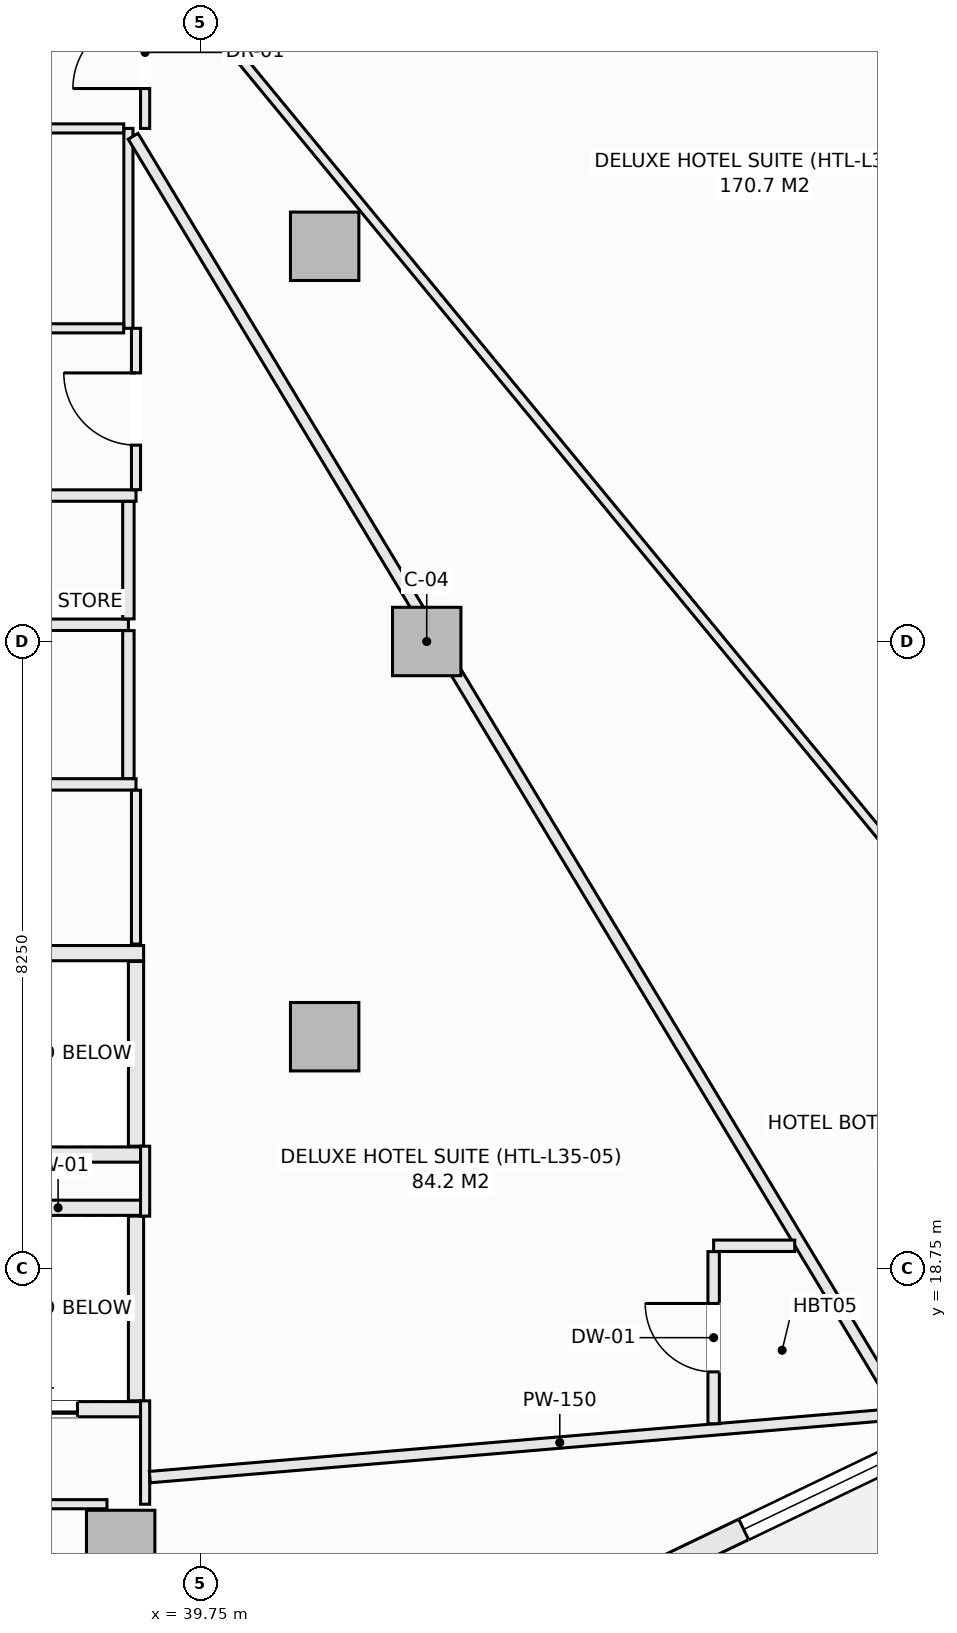
"""IFC4 building model, lengths in metres.
Left out: names, types, materials, properties, quantities, classifications, styles, units other than length and angle.
Written with IfcOpenShell. Run it as: python <this file> out.ifc"""

import sys

from ifc_helpers import new_model, si_unit, direction, frame, frame_2d, origin, origin_2d, place, context, subcontext, project, spatial, rectangle, extrude, element, fill, save


model = new_model("IFC4")
c1 = context("Model", 3, precision=1e-05, world=origin(), true_north=direction((0.0, 1.0)))
c2 = subcontext(c1, "Body", "Model", "MODEL_VIEW")
j1 = project(units=[si_unit("LENGTHUNIT", "METRE"), si_unit("PLANEANGLEUNIT", "RADIAN")], contexts=[c1])
p1 = place(None, origin())
s1 = spatial("IfcSite", under=j1, at=p1, CompositionType="ELEMENT")
p2 = place(p1, origin())
s2 = spatial("IfcBuilding", under=s1, at=p2, CompositionType="ELEMENT")
p3 = place(p2, frame((0.0, 0.0, 139.3)))
s3 = spatial("IfcBuildingStorey", under=s2, at=p3, CompositionType="ELEMENT", Elevation=139.3)
for number, where, z_axis, x_axis in (
    (1, (42.725, 27.0, -0.27), (0.0, 0.0, 1.0), (1.0, 0.0, 0.0)),
    (2, (41.382, 32.199, -0.27), (0.0, 0.0, 1.0), (1.0, 0.0, 0.0)),
    (3, (38.698, 15.121, -0.27), (0.0, 0.0, 1.0), (1.0, 0.0, 0.0)),
    (4, (41.382, 21.801, -0.27), (0.0, 0.0, 1.0), (1.0, 0.0, 0.0)),
):
    element("IfcColumn", number, at=place(p3, frame(where, z_axis=z_axis, x_axis=x_axis)), inside=s3, PredefinedType="COLUMN", context=c2, shape_type="SweptSolid", body=[
        extrude(rectangle(XDim=0.9, YDim=0.9, at=origin_2d()), origin(), (0.0, 0.0, 1.0), 3.4),
    ])
p4 = place(p3, frame((45.769, 14.777, 0.0), z_axis=(0.0, 0.0, 1.0), x_axis=(0.901370184739, 0.433049408339, 0.0)))
e5 = element("IfcWall", 5, at=p4, inside=s3, PredefinedType="SOLIDWALL", context=c2, shape_type="SweptSolid", body=[
    extrude(rectangle(XDim=5.884, YDim=0.3, at=frame_2d((2.942, 0.0))), origin(), (0.0, 0.0, 1.0), 2.653),
])
p5 = place(p4, frame((1.25, 0.0, 0.74)))
e6 = element("IfcOpeningElement", 6, at=p5, cuts=e5, PredefinedType="OPENING", context=c2, shape_type="SweptSolid", body=[
    extrude(rectangle(XDim=2.1, YDim=1.7, at=frame_2d((1.05, 0.85))), frame((0.0, 0.16, 0.0), z_axis=(0.0, -1.0, 0.0), x_axis=(1.0, 0.0, 0.0)), (0.0, 0.0, 1.0), 0.32),
])
p6 = place(p3, frame((48.413, 12.668, 0.0), z_axis=(0.0, 0.0, 1.0), x_axis=(0.869187658335, 0.494482370361, 0.0)))
e7 = element("IfcWall", 7, at=p6, inside=s3, PredefinedType="PARAPET", context=c2, shape_type="SweptSolid", body=[
    extrude(rectangle(XDim=6.606, YDim=0.22, at=frame_2d((3.303, 0.0))), origin(), (0.0, 0.0, 1.0), 0.52),
])
p7 = place(p3, frame((36.75, 19.55, 0.0), z_axis=(0.0, 0.0, 1.0), x_axis=(1.0, 0.0, 0.0)))
e8 = element("IfcWall", 8, at=p7, inside=s3, PredefinedType="SOLIDWALL", context=c2, shape_type="SweptSolid", body=[
    extrude(rectangle(XDim=2.25, YDim=0.2, at=frame_2d((1.125, 0.0))), origin(), (0.0, 0.0, 1.0), 3.13),
])
p8 = place(p3, frame((36.75, 16.9, 0.0), z_axis=(0.0, 0.0, 1.0), x_axis=(1.0, 0.0, 0.0)))
e9 = element("IfcWall", 9, at=p8, inside=s3, PredefinedType="SOLIDWALL", context=c2, shape_type="SweptSolid", body=[
    extrude(rectangle(XDim=2.25, YDim=0.2, at=frame_2d((1.125, 0.0))), origin(), (0.0, 0.0, 1.0), 3.13),
])
p9 = place(p8, frame((0.28, 0.0, 0.0)))
e10 = element("IfcOpeningElement", 10, at=p9, cuts=e9, PredefinedType="OPENING", context=c2, shape_type="SweptSolid", body=[
    extrude(rectangle(XDim=1.1, YDim=2.2, at=frame_2d((0.55, 1.1))), frame((0.0, 0.11, 0.0), z_axis=(0.0, -1.0, 0.0), x_axis=(1.0, 0.0, 0.0)), (0.0, 0.0, 1.0), 0.22),
])
p10 = place(p3, frame((38.9, 17.01, 0.0), z_axis=(0.0, 0.0, 1.0), x_axis=(0.0, 1.0, 0.0)))
e11 = element("IfcWall", 11, at=p10, inside=s3, PredefinedType="SOLIDWALL", context=c2, shape_type="SweptSolid", body=[
    extrude(rectangle(XDim=2.43, YDim=0.2, at=frame_2d((1.215, 0.0))), origin(), (0.0, 0.0, 1.0), 3.13),
])
for number, where, z_axis, x_axis in (
    (12, (36.75, 22.9, 0.0), (0.0, 0.0, 1.0), (1.0, 0.0, 0.0)),
    (13, (36.75, 20.25, 0.0), (0.0, 0.0, 1.0), (1.0, 0.0, 0.0)),
):
    element("IfcWall", number, at=place(p3, frame(where, z_axis=z_axis, x_axis=x_axis)), inside=s3, PredefinedType="SOLIDWALL", context=c2, shape_type="SweptSolid", body=[
        extrude(rectangle(XDim=2.25, YDim=0.2, at=frame_2d((1.125, 0.0))), origin(), (0.0, 0.0, 1.0), 3.13),
    ])
p11 = place(p3, frame((38.9, 20.36, 0.0), z_axis=(0.0, 0.0, 1.0), x_axis=(0.0, 1.0, 0.0)))
e14 = element("IfcWall", 14, at=p11, inside=s3, PredefinedType="SOLIDWALL", context=c2, shape_type="SweptSolid", body=[
    extrude(rectangle(XDim=2.43, YDim=0.2, at=frame_2d((1.215, 0.0))), origin(), (0.0, 0.0, 1.0), 3.13),
])
p12 = place(p3, frame((30.077, 28.92, 0.0), z_axis=(0.0, 0.0, 1.0), x_axis=(1.0, 0.0, 0.0)))
e15 = element("IfcWall", 15, at=p12, inside=s3, PredefinedType="PARTITIONING", context=c2, shape_type="SweptSolid", body=[
    extrude(rectangle(XDim=8.823, YDim=0.15, at=frame_2d((4.412, 0.0))), origin(), (0.0, 0.0, 1.0), 3.13),
])
p13 = place(p12, frame((1.342, 0.0, 0.0)))
e16 = element("IfcOpeningElement", 16, at=p13, cuts=e15, PredefinedType="OPENING", context=c2, shape_type="SweptSolid", body=[
    extrude(rectangle(XDim=0.95, YDim=2.1, at=frame_2d((0.475, 1.05))), frame((0.0, 0.085, 0.0), z_axis=(0.0, -1.0, 0.0), x_axis=(1.0, 0.0, 0.0)), (0.0, 0.0, 1.0), 0.17),
])
p14 = place(p12, frame((5.343, 0.0, 0.0)))
e17 = element("IfcOpeningElement", 17, at=p14, cuts=e15, PredefinedType="OPENING", context=c2, shape_type="SweptSolid", body=[
    extrude(rectangle(XDim=0.95, YDim=2.1, at=frame_2d((0.475, 1.05))), frame((0.0, 0.085, 0.0), z_axis=(0.0, -1.0, 0.0), x_axis=(1.0, 0.0, 0.0)), (0.0, 0.0, 1.0), 0.17),
])
p15 = place(p3, frame((33.377, 25.12, 0.0), z_axis=(0.0, 0.0, 1.0), x_axis=(1.0, 0.0, 0.0)))
e18 = element("IfcWall", 18, at=p15, inside=s3, PredefinedType="PARTITIONING", context=c2, shape_type="SweptSolid", body=[
    extrude(rectangle(XDim=5.523, YDim=0.15, at=frame_2d((2.761, 0.0))), origin(), (0.0, 0.0, 1.0), 3.13),
])
p16 = place(p15, frame((2.287, 0.0, 0.0)))
e19 = element("IfcOpeningElement", 19, at=p16, cuts=e18, PredefinedType="OPENING", context=c2, shape_type="SweptSolid", body=[
    extrude(rectangle(XDim=0.95, YDim=2.1, at=frame_2d((0.475, 1.05))), frame((0.0, 0.085, 0.0), z_axis=(0.0, -1.0, 0.0), x_axis=(1.0, 0.0, 0.0)), (0.0, 0.0, 1.0), 0.17),
])
p17 = place(p3, frame((33.377, 27.22, 0.0), z_axis=(0.0, 0.0, 1.0), x_axis=(1.0, 0.0, 0.0)))
e20 = element("IfcWall", 20, at=p17, inside=s3, PredefinedType="PARTITIONING", context=c2, shape_type="SweptSolid", body=[
    extrude(rectangle(XDim=5.423, YDim=0.15, at=frame_2d((2.711, 0.0))), origin(), (0.0, 0.0, 1.0), 3.13),
])
p18 = place(p3, frame((38.8, 25.197, 0.0), z_axis=(0.0, 0.0, 1.0), x_axis=(0.0, 1.0, 0.0)))
e21 = element("IfcWall", 21, at=p18, inside=s3, PredefinedType="PARTITIONING", context=c2, shape_type="SweptSolid", body=[
    extrude(rectangle(XDim=1.946, YDim=0.15, at=frame_2d((0.973, 0.0))), origin(), (0.0, 0.0, 1.0), 3.13),
])
p19 = place(p3, frame((38.8, 27.297, 0.0), z_axis=(0.0, 0.0, 1.0), x_axis=(0.0, 1.0, 0.0)))
e22 = element("IfcWall", 22, at=p19, inside=s3, PredefinedType="PARTITIONING", context=c2, shape_type="SweptSolid", body=[
    extrude(rectangle(XDim=1.546, YDim=0.15, at=frame_2d((0.773, 0.0))), origin(), (0.0, 0.0, 1.0), 3.13),
])
p20 = place(p3, frame((38.8, 31.12, 0.0), z_axis=(0.0, 0.0, 1.0), x_axis=(0.0, 1.0, 0.0)))
e23 = element("IfcWall", 23, at=p20, inside=s3, PredefinedType="PARTITIONING", context=c2, shape_type="SweptSolid", body=[
    extrude(rectangle(XDim=2.63, YDim=0.12, at=frame_2d((1.315, 0.0))), origin(), (0.0, 0.0, 1.0), 3.13),
])
p21 = place(p3, frame((30.062, 31.12, 0.0), z_axis=(0.0, 0.0, 1.0), x_axis=(1.0, 0.0, 0.0)))
e24 = element("IfcWall", 24, at=p21, inside=s3, PredefinedType="PARTITIONING", context=c2, shape_type="SweptSolid", body=[
    extrude(rectangle(XDim=8.676, YDim=0.12, at=frame_2d((4.338, 0.0))), origin(), (0.0, 0.0, 1.0), 3.13),
])
p22 = place(p21, frame((3.863, 0.0, 0.0)))
e25 = element("IfcOpeningElement", 25, at=p22, cuts=e24, PredefinedType="OPENING", context=c2, shape_type="SweptSolid", body=[
    extrude(rectangle(XDim=0.95, YDim=2.1, at=frame_2d((0.475, 1.05))), frame((0.0, 0.07, 0.0), z_axis=(0.0, -1.0, 0.0), x_axis=(1.0, 0.0, 0.0)), (0.0, 0.0, 1.0), 0.14),
])
p23 = place(p3, frame((30.062, 33.75, 0.0), z_axis=(0.0, 0.0, 1.0), x_axis=(1.0, 0.0, 0.0)))
e26 = element("IfcWall", 26, at=p23, inside=s3, PredefinedType="PARTITIONING", context=c2, shape_type="SweptSolid", body=[
    extrude(rectangle(XDim=8.676, YDim=0.12, at=frame_2d((4.338, 0.0))), origin(), (0.0, 0.0, 1.0), 3.13),
])
p24 = place(p3, frame((39.02, 15.65, 0.0), z_axis=(0.0, 0.0, 1.0), x_axis=(0.0, 1.0, 0.0)))
e27 = element("IfcWall", 27, at=p24, inside=s3, PredefinedType="PARTITIONING", context=c2, shape_type="SweptSolid", body=[
    extrude(rectangle(XDim=1.36, YDim=0.12, at=frame_2d((0.68, 0.0))), origin(), (0.0, 0.0, 1.0), 2.505),
])
p25 = place(p3, frame((39.02, 19.44, 0.0), z_axis=(0.0, 0.0, 1.0), x_axis=(0.0, 1.0, 0.0)))
e28 = element("IfcWall", 28, at=p25, inside=s3, PredefinedType="PARTITIONING", context=c2, shape_type="SweptSolid", body=[
    extrude(rectangle(XDim=0.92, YDim=0.12, at=frame_2d((0.46, 0.0))), origin(), (0.0, 0.0, 1.0), 3.13),
])
p26 = place(p3, frame((39.02, 33.75, 0.0), z_axis=(0.0, 0.0, 1.0), x_axis=(0.0, 1.0, 0.0)))
e29 = element("IfcWall", 29, at=p26, inside=s3, PredefinedType="PARTITIONING", context=c2, shape_type="SweptSolid", body=[
    extrude(rectangle(XDim=2.0, YDim=0.12, at=frame_2d((1.0, 0.0))), origin(), (0.0, 0.0, 1.0), 3.13),
])
p27 = place(p26, frame((0.525, 0.0, 0.0)))
e30 = element("IfcOpeningElement", 30, at=p27, cuts=e29, PredefinedType="OPENING", context=c2, shape_type="SweptSolid", body=[
    extrude(rectangle(XDim=0.95, YDim=2.1, at=frame_2d((0.475, 1.05))), frame((0.0, 0.07, 0.0), z_axis=(0.0, -1.0, 0.0), x_axis=(1.0, 0.0, 0.0)), (0.0, 0.0, 1.0), 0.14),
])
p28 = place(p3, frame((35.95, 15.65, 0.0), z_axis=(0.0, 0.0, 1.0), x_axis=(1.0, 0.0, 0.0)))
e31 = element("IfcWall", 31, at=p28, inside=s3, PredefinedType="PARTITIONING", context=c2, shape_type="SweptSolid", body=[
    extrude(rectangle(XDim=2.568, YDim=0.12, at=frame_2d((1.284, 0.0))), origin(), (0.0, 0.0, 1.0), 3.13),
])
p29 = place(p3, frame((38.9, 23.02, 0.0), z_axis=(0.0, 0.0, 1.0), x_axis=(0.0, 1.0, 0.0)))
e32 = element("IfcWall", 32, at=p29, inside=s3, PredefinedType="PARTITIONING", context=c2, shape_type="SweptSolid", body=[
    extrude(rectangle(XDim=2.023, YDim=0.12, at=frame_2d((1.011, 0.0))), origin(), (0.0, 0.0, 1.0), 3.13),
])
p30 = place(p3, frame((38.9, 28.997, 0.0), z_axis=(0.0, 0.0, 1.0), x_axis=(0.0, 1.0, 0.0)))
e33 = element("IfcWall", 33, at=p30, inside=s3, PredefinedType="PARTITIONING", context=c2, shape_type="SweptSolid", body=[
    extrude(rectangle(XDim=2.123, YDim=0.12, at=frame_2d((1.062, 0.0))), origin(), (0.0, 0.0, 1.0), 3.13),
])
p31 = place(p30, frame((0.586, 0.0, 0.0)))
e34 = element("IfcOpeningElement", 34, at=p31, cuts=e33, PredefinedType="OPENING", context=c2, shape_type="SweptSolid", body=[
    extrude(rectangle(XDim=0.95, YDim=2.1, at=frame_2d((0.475, 1.05))), frame((0.0, 0.07, 0.0), z_axis=(0.0, -1.0, 0.0), x_axis=(1.0, 0.0, 0.0)), (0.0, 0.0, 1.0), 0.14),
])
p32 = place(p3, frame((39.082, 16.007, 0.0), z_axis=(0.0, 0.0, 1.0), x_axis=(0.996467083395, 0.083984234889, 0.0)))
e35 = element("IfcWall", 35, at=p32, inside=s3, PredefinedType="PARTITIONING", context=c2, shape_type="SweptSolid", body=[
    extrude(rectangle(XDim=10.826, YDim=0.15, at=frame_2d((5.413, 0.0))), origin(), (0.0, 0.0, 1.0), 2.653),
])
p33 = place(p3, frame((38.862, 33.647, 0.0), z_axis=(0.0, 0.0, 1.0), x_axis=(0.516075497247, -0.856543099407, 0.0)))
e36 = element("IfcWall", 36, at=p33, inside=s3, PredefinedType="PARTITIONING", context=c2, shape_type="SweptSolid", body=[
    extrude(rectangle(XDim=19.534, YDim=0.15, at=frame_2d((9.767, 0.0))), origin(), (0.0, 0.0, 1.0), 1.922),
])
p34 = place(p3, frame((46.5, 19.05, 0.0), z_axis=(0.0, 0.0, 1.0), x_axis=(1.0, 0.0, 0.0)))
e37 = element("IfcWall", 37, at=p34, inside=s3, PredefinedType="PARTITIONING", context=c2, shape_type="SweptSolid", body=[
    extrude(rectangle(XDim=1.067, YDim=0.15, at=frame_2d((0.534, 0.0))), origin(), (0.0, 0.0, 1.0), 1.922),
])
p35 = place(p3, frame((46.5, 16.709, 0.0), z_axis=(0.0, 0.0, 1.0), x_axis=(0.0, 1.0, 0.0)))
e38 = element("IfcWall", 38, at=p35, inside=s3, PredefinedType="PARTITIONING", context=c2, shape_type="SweptSolid", body=[
    extrude(rectangle(XDim=2.264, YDim=0.15, at=frame_2d((1.132, 0.0))), origin(), (0.0, 0.0, 1.0), 3.13),
])
p36 = place(p35, frame((0.682, 0.0, 0.0)))
e39 = element("IfcOpeningElement", 39, at=p36, cuts=e38, PredefinedType="OPENING", context=c2, shape_type="SweptSolid", body=[
    extrude(rectangle(XDim=0.9, YDim=2.1, at=frame_2d((0.45, 1.05))), frame((0.0, 0.085, 0.0), z_axis=(0.0, -1.0, 0.0), x_axis=(1.0, 0.0, 0.0)), (0.0, 0.0, 1.0), 0.17),
])
p37 = place(p3, frame((35.479, 40.488, 0.0), z_axis=(0.0, 0.0, 1.0), x_axis=(0.636055982797, -0.771642914014, 0.0)))
e40 = element("IfcWall", 40, at=p37, inside=s3, PredefinedType="PARTITIONING", context=c2, shape_type="SweptSolid", body=[
    extrude(rectangle(XDim=26.473, YDim=0.12, at=frame_2d((13.236, 0.0))), origin(), (0.0, 0.0, 1.0), 2.812),
])
p38 = place(p5, origin())
e41 = element("IfcWindow", 41, at=p38, inside=s3, PartitioningType="SINGLE_PANEL", PredefinedType="WINDOW", context=c2, shape_type="SweptSolid", body=[
    extrude(rectangle(XDim=2.1, YDim=1.7, at=frame_2d((1.05, 0.85))), frame((0.0, 0.03, 0.0), z_axis=(0.0, -1.0, 0.0), x_axis=(1.0, 0.0, 0.0)), (0.0, 0.0, 1.0), 0.06),
])
fill(e6, e41)
p39 = place(p9, origin())
e42 = element("IfcDoor", 42, at=p39, inside=s3, OperationType="SLIDING_TO_LEFT", PredefinedType="DOOR", context=c2, shape_type="SweptSolid", body=[
    extrude(rectangle(XDim=1.1, YDim=2.2, at=frame_2d((0.55, 1.1))), frame((0.0, 0.025, 0.0), z_axis=(0.0, -1.0, 0.0), x_axis=(1.0, 0.0, 0.0)), (0.0, 0.0, 1.0), 0.05),
])
fill(e10, e42)
p40 = place(p31, origin())
e43 = element("IfcDoor", 43, at=p40, inside=s3, OperationType="SINGLE_SWING_RIGHT", PredefinedType="DOOR", context=c2, shape_type="SweptSolid", body=[
    extrude(rectangle(XDim=0.95, YDim=2.1, at=frame_2d((0.475, 1.05))), frame((0.0, 0.025, 0.0), z_axis=(0.0, -1.0, 0.0), x_axis=(1.0, 0.0, 0.0)), (0.0, 0.0, 1.0), 0.05),
])
fill(e34, e43)
p41 = place(p27, origin())
e44 = element("IfcDoor", 44, at=p41, inside=s3, OperationType="SINGLE_SWING_LEFT", PredefinedType="DOOR", context=c2, shape_type="SweptSolid", body=[
    extrude(rectangle(XDim=0.95, YDim=2.1, at=frame_2d((0.475, 1.05))), frame((0.0, 0.025, 0.0), z_axis=(0.0, -1.0, 0.0), x_axis=(1.0, 0.0, 0.0)), (0.0, 0.0, 1.0), 0.05),
])
fill(e30, e44)
p42 = place(p36, origin())
e45 = element("IfcDoor", 45, at=p42, inside=s3, OperationType="SINGLE_SWING_RIGHT", PredefinedType="DOOR", context=c2, shape_type="SweptSolid", body=[
    extrude(rectangle(XDim=0.9, YDim=2.1, at=frame_2d((0.45, 1.05))), frame((0.0, 0.025, 0.0), z_axis=(0.0, -1.0, 0.0), x_axis=(1.0, 0.0, 0.0)), (0.0, 0.0, 1.0), 0.05),
])
fill(e39, e45)
save(model, sys.argv[1])
